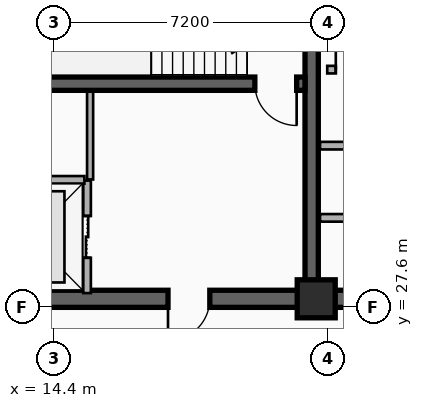
"""IFC4 building model, lengths in metres.
Left out: names, types, materials, properties, quantities, classifications, styles, units other than length and angle.
Written with IfcOpenShell. Run it as: python <this file> out.ifc"""

import sys

from ifc_helpers import new_model, si_unit, direction, frame, frame_2d, origin, origin_2d, place, context, subcontext, project, spatial, rectangle, extrude, element, fill, save


model = new_model("IFC4")
c1 = context("Model", 3, precision=1e-05, world=origin(), true_north=direction((0.0, 1.0)))
c2 = subcontext(c1, "Body", "Model", "MODEL_VIEW")
j1 = project(units=[si_unit("LENGTHUNIT", "METRE"), si_unit("PLANEANGLEUNIT", "RADIAN")], contexts=[c1])
p1 = place(None, origin())
s1 = spatial("IfcSite", under=j1, at=p1, CompositionType="ELEMENT")
p2 = place(p1, origin())
s2 = spatial("IfcBuilding", under=s1, at=p2, CompositionType="ELEMENT")
p3 = place(p2, frame((0.0, 0.0, 222.0)))
s3 = spatial("IfcBuildingStorey", under=s2, at=p3, CompositionType="ELEMENT", Elevation=222.0)
p4 = place(p3, frame((21.18, 27.82, 0.0), z_axis=(0.0, 0.0, 1.0), x_axis=(-1.0, 0.0, 0.0)))
e1 = element("IfcWall", 1, at=p4, inside=s3, PredefinedType="SHEAR", context=c2, shape_type="SweptSolid", body=[
    extrude(rectangle(XDim=9.03, YDim=0.45, at=frame_2d((4.515, 0.0))), origin(), (0.0, 0.0, 1.0), 3.6),
])
p5 = place(p4, frame((2.68, 0.0, 0.0)))
e2 = element("IfcOpeningElement", 2, at=p5, cuts=e1, PredefinedType="OPENING", context=c2, shape_type="SweptSolid", body=[
    extrude(rectangle(XDim=1.1, YDim=2.15, at=frame_2d((0.55, 1.075))), frame((0.0, 0.235, 0.0), z_axis=(0.0, -1.0, 0.0), x_axis=(1.0, 0.0, 0.0)), (0.0, 0.0, 1.0), 0.47),
])
p6 = place(p3, frame((33.15, 27.82, 0.0), z_axis=(0.0, 0.0, 1.0), x_axis=(-1.0, 0.0, 0.0)))
e3 = element("IfcWall", 3, at=p6, inside=s3, PredefinedType="SHEAR", context=c2, shape_type="SweptSolid", body=[
    extrude(rectangle(XDim=11.97, YDim=0.45, at=frame_2d((5.985, 0.0))), origin(), (0.0, 0.0, 1.0), 3.6),
])
p7 = place(p6, frame((6.1, 0.0, 0.0)))
e4 = element("IfcOpeningElement", 4, at=p7, cuts=e3, PredefinedType="OPENING", context=c2, shape_type="SweptSolid", body=[
    extrude(rectangle(XDim=1.6, YDim=2.2, at=frame_2d((0.8, 1.1))), frame((0.0, 0.235, 0.0), z_axis=(0.0, -1.0, 0.0), x_axis=(1.0, 0.0, 0.0)), (0.0, 0.0, 1.0), 0.47),
])
p8 = place(p3, frame((21.18, 28.045, 0.0), z_axis=(0.0, 0.0, 1.0), x_axis=(0.0, 1.0, 0.0)))
e5 = element("IfcWall", 5, at=p8, inside=s3, PredefinedType="SHEAR", context=c2, shape_type="SweptSolid", body=[
    extrude(rectangle(XDim=8.78, YDim=0.35, at=frame_2d((4.39, 0.0))), origin(), (0.0, 0.0, 1.0), 3.6),
])
p9 = place(p3, frame((21.005, 33.48, 0.0), z_axis=(0.0, 0.0, 1.0), x_axis=(-1.0, 0.0, 0.0)))
e6 = element("IfcWall", 6, at=p9, inside=s3, PredefinedType="SHEAR", context=c2, shape_type="SweptSolid", body=[
    extrude(rectangle(XDim=8.63, YDim=0.35, at=frame_2d((4.315, 0.0))), origin(), (0.0, 0.0, 1.0), 3.6),
])
p10 = place(p9, frame((0.22, 0.0, 0.0)))
e7 = element("IfcOpeningElement", 7, at=p10, cuts=e6, PredefinedType="OPENING", context=c2, shape_type="SweptSolid", body=[
    extrude(rectangle(XDim=1.1, YDim=2.15, at=frame_2d((0.55, 1.075))), frame((0.0, 0.185, 0.0), z_axis=(0.0, -1.0, 0.0), x_axis=(1.0, 0.0, 0.0)), (0.0, 0.0, 1.0), 0.37),
])
p11 = place(p3, frame((21.3, 27.82, 0.0), z_axis=(0.0, 0.0, 1.0), x_axis=(1.0, 0.0, 0.0)))
e8 = element("IfcColumn", 8, at=p11, inside=s3, PredefinedType="COLUMN", context=c2, shape_type="SweptSolid", body=[
    extrude(rectangle(XDim=1.0, YDim=1.0, at=origin_2d()), origin(), (0.0, 0.0, 1.0), 3.6),
])
p12 = place(p3, frame((15.27, 27.97, 0.0), z_axis=(0.0, 0.0, 1.0), x_axis=(0.0, 1.0, 0.0)))
e9 = element("IfcWall", 9, at=p12, inside=s3, PredefinedType="PARTITIONING", context=c2, shape_type="SweptSolid", body=[
    extrude(rectangle(XDim=2.96, YDim=0.2, at=frame_2d((1.48, 0.0))), origin(), (0.0, 0.0, 1.0), 2.41),
])
p13 = place(p12, frame((0.93, 0.0, 0.0)))
e10 = element("IfcOpeningElement", 10, at=p13, cuts=e9, PredefinedType="OPENING", context=c2, shape_type="SweptSolid", body=[
    extrude(rectangle(XDim=1.1, YDim=2.15, at=frame_2d((0.55, 1.075))), frame((0.0, 0.11, 0.0), z_axis=(0.0, -1.0, 0.0), x_axis=(1.0, 0.0, 0.0)), (0.0, 0.0, 1.0), 0.22),
])
p14 = place(p3, frame((12.45, 30.95, 0.0), z_axis=(0.0, 0.0, 1.0), x_axis=(1.0, 0.0, 0.0)))
e11 = element("IfcWall", 11, at=p14, inside=s3, PredefinedType="PARTITIONING", context=c2, shape_type="SweptSolid", body=[
    extrude(rectangle(XDim=2.75, YDim=0.2, at=frame_2d((1.375, 0.0))), origin(), (0.0, 0.0, 1.0), 2.41),
])
p15 = place(p3, frame((21.4, 31.85, 0.0), z_axis=(0.0, 0.0, 1.0), x_axis=(1.0, 0.0, 0.0)))
e12 = element("IfcWall", 12, at=p15, inside=s3, PredefinedType="PARTITIONING", context=c2, shape_type="SweptSolid", body=[
    extrude(rectangle(XDim=3.66, YDim=0.2, at=frame_2d((1.83, 0.0))), origin(), (0.0, 0.0, 1.0), 2.41),
])
p16 = place(p15, frame((1.23, 0.0, 0.0)))
e13 = element("IfcOpeningElement", 13, at=p16, cuts=e12, PredefinedType="OPENING", context=c2, shape_type="SweptSolid", body=[
    extrude(rectangle(XDim=1.2, YDim=2.15, at=frame_2d((0.6, 1.075))), frame((0.0, 0.11, 0.0), z_axis=(0.0, -1.0, 0.0), x_axis=(1.0, 0.0, 0.0)), (0.0, 0.0, 1.0), 0.22),
])
p17 = place(p3, frame((21.59, 33.85, 0.0), z_axis=(0.0, 0.0, 1.0), x_axis=(1.0, 0.0, 0.0)))
e14 = element("IfcWall", 14, at=p17, inside=s3, PredefinedType="PARTITIONING", context=c2, shape_type="SweptSolid", body=[
    extrude(rectangle(XDim=3.52, YDim=0.2, at=frame_2d((1.76, 0.0))), origin(), (0.0, 0.0, 1.0), 2.41),
])
p18 = place(p17, frame((0.225, 0.0, 0.0)))
e15 = element("IfcOpeningElement", 15, at=p18, cuts=e14, PredefinedType="OPENING", context=c2, shape_type="SweptSolid", body=[
    extrude(rectangle(XDim=1.2, YDim=2.15, at=frame_2d((0.6, 1.075))), frame((0.0, 0.11, 0.0), z_axis=(0.0, -1.0, 0.0), x_axis=(1.0, 0.0, 0.0)), (0.0, 0.0, 1.0), 0.22),
])
p19 = place(p3, frame((21.4, 29.95, 0.0), z_axis=(0.0, 0.0, 1.0), x_axis=(1.0, 0.0, 0.0)))
e16 = element("IfcWall", 16, at=p19, inside=s3, PredefinedType="PARTITIONING", context=c2, shape_type="SweptSolid", body=[
    extrude(rectangle(XDim=3.66, YDim=0.2, at=frame_2d((1.83, 0.0))), origin(), (0.0, 0.0, 1.0), 2.41),
])
p20 = place(p3, frame((15.35, 30.96, 0.0), z_axis=(0.0, 0.0, 1.0), x_axis=(0.0, 1.0, 0.0)))
e17 = element("IfcWall", 17, at=p20, inside=s3, PredefinedType="PARTITIONING", context=c2, shape_type="SweptSolid", body=[
    extrude(rectangle(XDim=2.31, YDim=0.16, at=frame_2d((1.155, 0.0))), origin(), (0.0, 0.0, 1.0), 3.34),
])
p21 = place(p13, origin())
e18 = element("IfcDoor", 18, at=p21, inside=s3, OperationType="DOUBLE_DOOR_SLIDING", PredefinedType="DOOR", context=c2, shape_type="SweptSolid", body=[
    extrude(rectangle(XDim=1.1, YDim=2.15, at=frame_2d((0.55, 1.075))), frame((0.0, 0.025, 0.0), z_axis=(0.0, -1.0, 0.0), x_axis=(1.0, 0.0, 0.0)), (0.0, 0.0, 1.0), 0.05),
])
fill(e10, e18)
p22 = place(p10, origin())
e19 = element("IfcDoor", 19, at=p22, inside=s3, OperationType="SINGLE_SWING_LEFT", PredefinedType="DOOR", context=c2, shape_type="SweptSolid", body=[
    extrude(rectangle(XDim=1.1, YDim=2.15, at=frame_2d((0.55, 1.075))), frame((0.0, 0.025, 0.0), z_axis=(0.0, -1.0, 0.0), x_axis=(1.0, 0.0, 0.0)), (0.0, 0.0, 1.0), 0.05),
])
fill(e7, e19)
p23 = place(p5, origin())
e20 = element("IfcDoor", 20, at=p23, inside=s3, OperationType="SINGLE_SWING_RIGHT", PredefinedType="DOOR", context=c2, shape_type="SweptSolid", body=[
    extrude(rectangle(XDim=1.1, YDim=2.15, at=frame_2d((0.55, 1.075))), frame((0.0, 0.025, 0.0), z_axis=(0.0, -1.0, 0.0), x_axis=(1.0, 0.0, 0.0)), (0.0, 0.0, 1.0), 0.05),
])
fill(e2, e20)
p24 = place(p18, origin())
e21 = element("IfcDoor", 21, at=p24, inside=s3, OperationType="SINGLE_SWING_LEFT", PredefinedType="DOOR", context=c2, shape_type="SweptSolid", body=[
    extrude(rectangle(XDim=1.2, YDim=2.15, at=frame_2d((0.6, 1.075))), frame((0.0, 0.025, 0.0), z_axis=(0.0, -1.0, 0.0), x_axis=(1.0, 0.0, 0.0)), (0.0, 0.0, 1.0), 0.05),
])
fill(e15, e21)
save(model, sys.argv[1])
